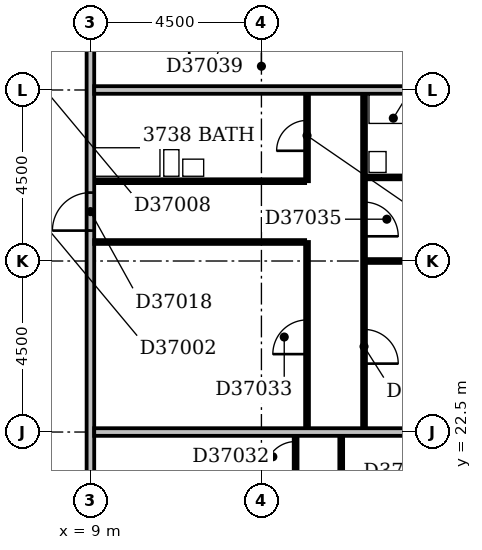
"""IFC4 building model, lengths in metres.
Left out: names, types, materials, properties, quantities, classifications, styles, units other than length and angle.
Written with IfcOpenShell. Run it as: python <this file> out.ifc"""

import sys

from ifc_helpers import new_model, si_unit, direction, frame, frame_2d, origin, place, context, subcontext, project, spatial, rectangle, extrude, element, fill, save


model = new_model("IFC4")
c1 = context("Model", 3, precision=1e-05, world=origin(), true_north=direction((0.0, 1.0)))
c2 = subcontext(c1, "Body", "Model", "MODEL_VIEW")
j1 = project(units=[si_unit("LENGTHUNIT", "METRE"), si_unit("PLANEANGLEUNIT", "RADIAN")], contexts=[c1])
p1 = place(None, origin())
s1 = spatial("IfcSite", under=j1, at=p1, CompositionType="ELEMENT")
p2 = place(p1, origin())
s2 = spatial("IfcBuilding", under=s1, at=p2, CompositionType="ELEMENT")
p3 = place(p2, frame((0.0, 0.0, 148.4)))
s3 = spatial("IfcBuildingStorey", under=s2, at=p3, CompositionType="ELEMENT", Elevation=148.4)
p4 = place(p3, frame((9.0, 5.0, 0.0), z_axis=(0.0, 0.0, 1.0), x_axis=(0.0, 1.0, 0.0)))
e1 = element("IfcWall", 1, at=p4, inside=s3, PredefinedType="PARTITIONING", context=c2, shape_type="SweptSolid", body=[
    extrude(rectangle(XDim=27.75, YDim=0.2, at=frame_2d((13.875, 0.0))), origin(), (0.0, 0.0, 1.0), 3.3),
])
p5 = place(p4, frame((22.8, 0.0, 0.0)))
e2 = element("IfcOpeningElement", 2, at=p5, cuts=e1, PredefinedType="OPENING", context=c2, shape_type="SweptSolid", body=[
    extrude(rectangle(XDim=1.0, YDim=2.1, at=frame_2d((0.5, 1.05))), frame((0.0, 0.112, 0.0), z_axis=(0.0, -1.0, 0.0), x_axis=(1.0, 0.0, 0.0)), (0.0, 0.0, 1.0), 0.224),
])
p6 = place(p4, frame((14.95, 0.0, 0.0)))
e3 = element("IfcOpeningElement", 3, at=p6, cuts=e1, PredefinedType="OPENING", context=c2, shape_type="SweptSolid", body=[
    extrude(rectangle(XDim=1.0, YDim=2.1, at=frame_2d((0.5, 1.05))), frame((0.0, 0.112, 0.0), z_axis=(0.0, -1.0, 0.0), x_axis=(1.0, 0.0, 0.0)), (0.0, 0.0, 1.0), 0.224),
])
p7 = place(p4, frame((10.45, 0.0, 0.0)))
e4 = element("IfcOpeningElement", 4, at=p7, cuts=e1, PredefinedType="OPENING", context=c2, shape_type="SweptSolid", body=[
    extrude(rectangle(XDim=1.0, YDim=2.1, at=frame_2d((0.5, 1.05))), frame((0.0, 0.112, 0.0), z_axis=(0.0, -1.0, 0.0), x_axis=(1.0, 0.0, 0.0)), (0.0, 0.0, 1.0), 0.224),
])
p8 = place(p4, frame((5.95, 0.0, 0.0)))
e5 = element("IfcOpeningElement", 5, at=p8, cuts=e1, PredefinedType="OPENING", context=c2, shape_type="SweptSolid", body=[
    extrude(rectangle(XDim=1.0, YDim=2.1, at=frame_2d((0.5, 1.05))), frame((0.0, 0.112, 0.0), z_axis=(0.0, -1.0, 0.0), x_axis=(1.0, 0.0, 0.0)), (0.0, 0.0, 1.0), 0.224),
])
p9 = place(p4, frame((1.5, 0.0, 0.0)))
e6 = element("IfcOpeningElement", 6, at=p9, cuts=e1, PredefinedType="OPENING", context=c2, shape_type="SweptSolid", body=[
    extrude(rectangle(XDim=0.9, YDim=2.1, at=frame_2d((0.45, 1.05))), frame((0.0, 0.112, 0.0), z_axis=(0.0, -1.0, 0.0), x_axis=(1.0, 0.0, 0.0)), (0.0, 0.0, 1.0), 0.224),
])
p10 = place(p3, frame((15.6, 18.1, 0.0), z_axis=(0.0, 0.0, 1.0), x_axis=(0.0, 1.0, 0.0)))
e7 = element("IfcWall", 7, at=p10, inside=s3, PredefinedType="PARTITIONING", context=c2, shape_type="SweptSolid", body=[
    extrude(rectangle(XDim=4.3, YDim=0.1, at=frame_2d((2.15, 0.0))), origin(), (0.0, 0.0, 1.0), 3.3),
])
p11 = place(p10, frame((1.7, 0.0, 0.0)))
e8 = element("IfcOpeningElement", 8, at=p11, cuts=e7, PredefinedType="OPENING", context=c2, shape_type="SweptSolid", body=[
    extrude(rectangle(XDim=0.9, YDim=2.1, at=frame_2d((0.45, 1.05))), frame((0.0, 0.062, 0.0), z_axis=(0.0, -1.0, 0.0), x_axis=(1.0, 0.0, 0.0)), (0.0, 0.0, 1.0), 0.124),
])
p12 = place(p3, frame((14.4, 21.2, 0.0), z_axis=(0.0, 0.0, 1.0), x_axis=(0.0, 1.0, 0.0)))
e9 = element("IfcWall", 9, at=p12, inside=s3, PredefinedType="PARTITIONING", context=c2, shape_type="SweptSolid", body=[
    extrude(rectangle(XDim=1.2, YDim=0.1, at=frame_2d((0.6, 0.0))), origin(), (0.0, 0.0, 1.0), 3.3),
])
p13 = place(p12, frame((0.25, 0.0, 0.0)))
e10 = element("IfcOpeningElement", 10, at=p13, cuts=e9, PredefinedType="OPENING", context=c2, shape_type="SweptSolid", body=[
    extrude(rectangle(XDim=0.8, YDim=2.1, at=frame_2d((0.4, 1.05))), frame((0.0, 0.062, 0.0), z_axis=(0.0, -1.0, 0.0), x_axis=(1.0, 0.0, 0.0)), (0.0, 0.0, 1.0), 0.124),
])
p14 = place(p3, frame((9.1, 22.5, 0.0), z_axis=(0.0, 0.0, 1.0), x_axis=(1.0, 0.0, 0.0)))
e11 = element("IfcWall", 11, at=p14, inside=s3, PredefinedType="PARTITIONING", context=c2, shape_type="SweptSolid", body=[
    extrude(rectangle(XDim=12.9, YDim=0.2, at=frame_2d((6.45, 0.0))), origin(), (0.0, 0.0, 1.0), 3.3),
])
p15 = place(p3, frame((14.7, 22.6, 0.0), z_axis=(0.0, 0.0, 1.0), x_axis=(0.0, 1.0, 0.0)))
e12 = element("IfcWall", 12, at=p15, inside=s3, PredefinedType="PARTITIONING", context=c2, shape_type="SweptSolid", body=[
    extrude(rectangle(XDim=4.9, YDim=0.1, at=frame_2d((2.45, 0.0))), origin(), (0.0, 0.0, 1.0), 3.3),
])
p16 = place(p15, frame((1.95, 0.0, 0.0)))
e13 = element("IfcOpeningElement", 13, at=p16, cuts=e12, PredefinedType="OPENING", context=c2, shape_type="SweptSolid", body=[
    extrude(rectangle(XDim=0.9, YDim=2.1, at=frame_2d((0.45, 1.05))), frame((0.0, 0.062, 0.0), z_axis=(0.0, -1.0, 0.0), x_axis=(1.0, 0.0, 0.0)), (0.0, 0.0, 1.0), 0.124),
])
p17 = place(p3, frame((16.2, 22.6, 0.0), z_axis=(0.0, 0.0, 1.0), x_axis=(0.0, 1.0, 0.0)))
e14 = element("IfcWall", 14, at=p17, inside=s3, PredefinedType="PARTITIONING", context=c2, shape_type="SweptSolid", body=[
    extrude(rectangle(XDim=8.8, YDim=0.1, at=frame_2d((4.4, 0.0))), origin(), (0.0, 0.0, 1.0), 3.3),
])
p18 = place(p17, frame((1.7, 0.0, 0.0)))
e15 = element("IfcOpeningElement", 15, at=p18, cuts=e14, PredefinedType="OPENING", context=c2, shape_type="SweptSolid", body=[
    extrude(rectangle(XDim=0.9, YDim=2.1, at=frame_2d((0.45, 1.05))), frame((0.0, 0.062, 0.0), z_axis=(0.0, -1.0, 0.0), x_axis=(1.0, 0.0, 0.0)), (0.0, 0.0, 1.0), 0.124),
])
p19 = place(p17, frame((5.05, 0.0, 0.0)))
e16 = element("IfcOpeningElement", 16, at=p19, cuts=e14, PredefinedType="OPENING", context=c2, shape_type="SweptSolid", body=[
    extrude(rectangle(XDim=0.9, YDim=2.1, at=frame_2d((0.45, 1.05))), frame((0.0, 0.062, 0.0), z_axis=(0.0, -1.0, 0.0), x_axis=(1.0, 0.0, 0.0)), (0.0, 0.0, 1.0), 0.124),
])
p20 = place(p3, frame((16.25, 27.0, 0.0), z_axis=(0.0, 0.0, 1.0), x_axis=(1.0, 0.0, 0.0)))
e17 = element("IfcWall", 17, at=p20, inside=s3, PredefinedType="PARTITIONING", context=c2, shape_type="SweptSolid", body=[
    extrude(rectangle(XDim=5.75, YDim=0.1, at=frame_2d((2.875, 0.0))), origin(), (0.0, 0.0, 1.0), 2.7),
])
p21 = place(p3, frame((9.1, 27.5, 0.0), z_axis=(0.0, 0.0, 1.0), x_axis=(1.0, 0.0, 0.0)))
e18 = element("IfcWall", 18, at=p21, inside=s3, PredefinedType="PARTITIONING", context=c2, shape_type="SweptSolid", body=[
    extrude(rectangle(XDim=5.55, YDim=0.1, at=frame_2d((2.775, 0.0))), origin(), (0.0, 0.0, 1.0), 2.7),
])
p22 = place(p3, frame((9.1, 29.1, 0.0), z_axis=(0.0, 0.0, 1.0), x_axis=(1.0, 0.0, 0.0)))
e19 = element("IfcWall", 19, at=p22, inside=s3, PredefinedType="PLUMBINGWALL", context=c2, shape_type="SweptSolid", body=[
    extrude(rectangle(XDim=5.55, YDim=0.1, at=frame_2d((2.775, 0.0))), origin(), (0.0, 0.0, 1.0), 3.3),
])
p23 = place(p3, frame((14.7, 29.1, 0.0), z_axis=(0.0, 0.0, 1.0), x_axis=(0.0, 1.0, 0.0)))
e20 = element("IfcWall", 20, at=p23, inside=s3, PredefinedType="PARTITIONING", context=c2, shape_type="SweptSolid", body=[
    extrude(rectangle(XDim=2.3, YDim=0.1, at=frame_2d((1.15, 0.0))), origin(), (0.0, 0.0, 1.0), 3.3),
])
p24 = place(p23, frame((0.8, 0.0, 0.0)))
e21 = element("IfcOpeningElement", 21, at=p24, cuts=e20, PredefinedType="OPENING", context=c2, shape_type="SweptSolid", body=[
    extrude(rectangle(XDim=0.8, YDim=2.1, at=frame_2d((0.4, 1.05))), frame((0.0, 0.062, 0.0), z_axis=(0.0, -1.0, 0.0), x_axis=(1.0, 0.0, 0.0)), (0.0, 0.0, 1.0), 0.124),
])
p25 = place(p3, frame((16.25, 29.2, 0.0), z_axis=(0.0, 0.0, 1.0), x_axis=(1.0, 0.0, 0.0)))
e22 = element("IfcWall", 22, at=p25, inside=s3, PredefinedType="PLUMBINGWALL", context=c2, shape_type="SweptSolid", body=[
    extrude(rectangle(XDim=2.8, YDim=0.1, at=frame_2d((1.4, 0.0))), origin(), (0.0, 0.0, 1.0), 3.3),
])
p26 = place(p25, frame((1.0, 0.0, 0.0)))
e23 = element("IfcOpeningElement", 23, at=p26, cuts=e22, PredefinedType="OPENING", context=c2, shape_type="SweptSolid", body=[
    extrude(rectangle(XDim=0.8, YDim=2.1, at=frame_2d((0.4, 1.05))), frame((0.0, 0.062, 0.0), z_axis=(0.0, -1.0, 0.0), x_axis=(1.0, 0.0, 0.0)), (0.0, 0.0, 1.0), 0.124),
])
p27 = place(p3, frame((9.1, 31.5, 0.0), z_axis=(0.0, 0.0, 1.0), x_axis=(1.0, 0.0, 0.0)))
e24 = element("IfcWall", 24, at=p27, inside=s3, PredefinedType="PARTITIONING", context=c2, shape_type="SweptSolid", body=[
    extrude(rectangle(XDim=12.9, YDim=0.2, at=frame_2d((6.45, 0.0))), origin(), (0.0, 0.0, 1.0), 3.3),
])
p28 = place(p5, origin())
e25 = element("IfcDoor", 25, at=p28, inside=s3, OperationType="SINGLE_SWING_LEFT", PredefinedType="DOOR", context=c2, shape_type="SweptSolid", body=[
    extrude(rectangle(XDim=1.0, YDim=2.1, at=frame_2d((0.5, 1.05))), frame((0.0, 0.025, 0.0), z_axis=(0.0, -1.0, 0.0), x_axis=(1.0, 0.0, 0.0)), (0.0, 0.0, 1.0), 0.05),
])
fill(e2, e25)
p29 = place(p13, origin())
e26 = element("IfcDoor", 26, at=p29, inside=s3, OperationType="SINGLE_SWING_LEFT", PredefinedType="DOOR", context=c2, shape_type="SweptSolid", body=[
    extrude(rectangle(XDim=0.8, YDim=2.1, at=frame_2d((0.4, 1.05))), frame((0.0, 0.025, 0.0), z_axis=(0.0, -1.0, 0.0), x_axis=(1.0, 0.0, 0.0)), (0.0, 0.0, 1.0), 0.05),
])
fill(e10, e26)
p30 = place(p16, origin())
e27 = element("IfcDoor", 27, at=p30, inside=s3, OperationType="SINGLE_SWING_LEFT", PredefinedType="DOOR", context=c2, shape_type="SweptSolid", body=[
    extrude(rectangle(XDim=0.9, YDim=2.1, at=frame_2d((0.45, 1.05))), frame((0.0, 0.025, 0.0), z_axis=(0.0, -1.0, 0.0), x_axis=(1.0, 0.0, 0.0)), (0.0, 0.0, 1.0), 0.05),
])
fill(e13, e27)
p31 = place(p18, frame((0.9, 0.0, 0.0), z_axis=(0.0, 0.0, 1.0), x_axis=(-1.0, 0.0, 0.0)))
e28 = element("IfcDoor", 28, at=p31, inside=s3, OperationType="SINGLE_SWING_RIGHT", PredefinedType="DOOR", context=c2, shape_type="SweptSolid", body=[
    extrude(rectangle(XDim=0.9, YDim=2.1, at=frame_2d((0.45, 1.05))), frame((0.0, 0.025, 0.0), z_axis=(0.0, -1.0, 0.0), x_axis=(1.0, 0.0, 0.0)), (0.0, 0.0, 1.0), 0.05),
])
fill(e15, e28)
p32 = place(p19, frame((0.9, 0.0, 0.0), z_axis=(0.0, 0.0, 1.0), x_axis=(-1.0, 0.0, 0.0)))
e29 = element("IfcDoor", 29, at=p32, inside=s3, OperationType="SINGLE_SWING_RIGHT", PredefinedType="DOOR", context=c2, shape_type="SweptSolid", body=[
    extrude(rectangle(XDim=0.9, YDim=2.1, at=frame_2d((0.45, 1.05))), frame((0.0, 0.025, 0.0), z_axis=(0.0, -1.0, 0.0), x_axis=(1.0, 0.0, 0.0)), (0.0, 0.0, 1.0), 0.05),
])
fill(e16, e29)
p33 = place(p24, origin())
e30 = element("IfcDoor", 30, at=p33, inside=s3, OperationType="SINGLE_SWING_LEFT", PredefinedType="DOOR", context=c2, shape_type="SweptSolid", body=[
    extrude(rectangle(XDim=0.8, YDim=2.1, at=frame_2d((0.4, 1.05))), frame((0.0, 0.025, 0.0), z_axis=(0.0, -1.0, 0.0), x_axis=(1.0, 0.0, 0.0)), (0.0, 0.0, 1.0), 0.05),
])
fill(e21, e30)
save(model, sys.argv[1])
